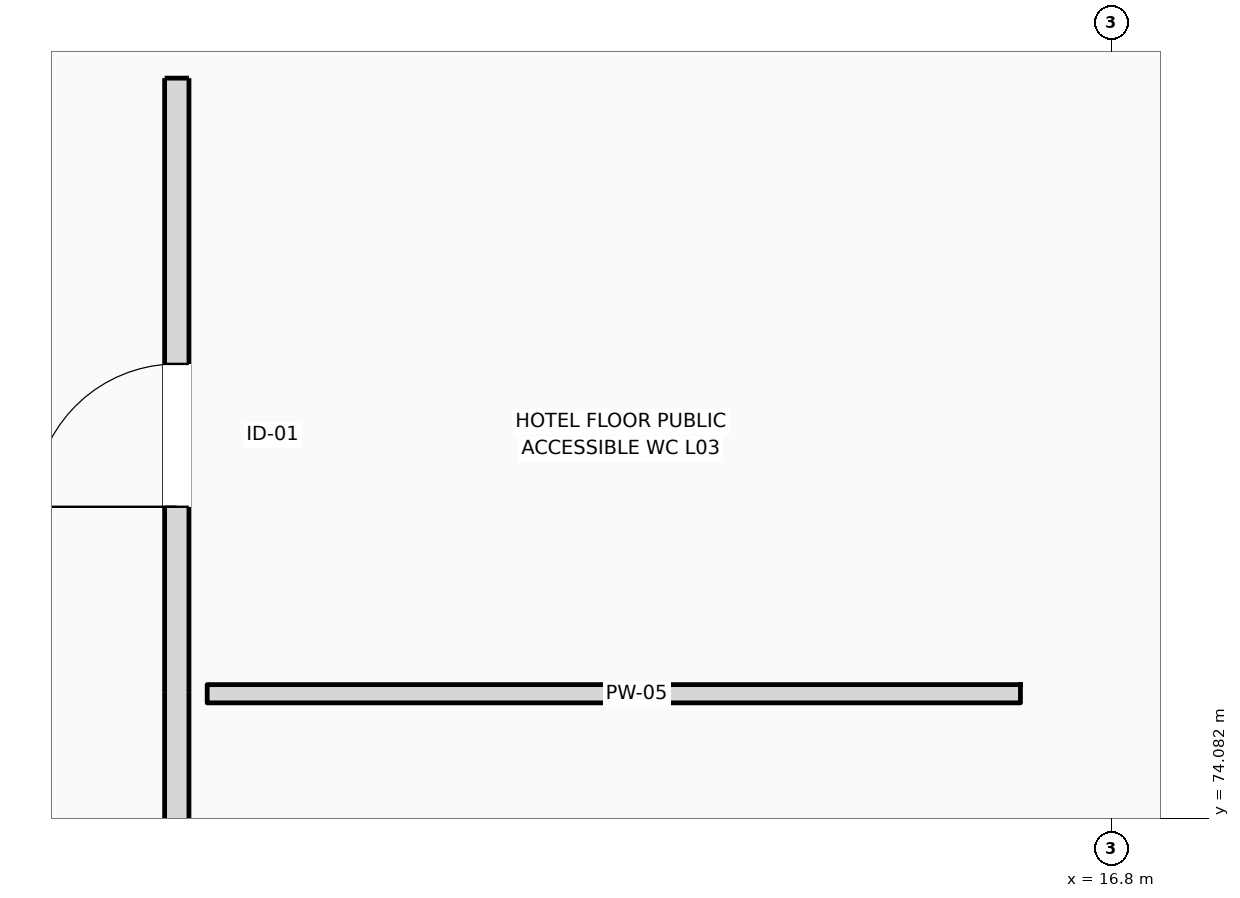
"""IFC4 building model, lengths in metres.
Left out: names, types, materials, properties, quantities, classifications, styles, units other than length and angle.
Written with IfcOpenShell. Run it as: python <this file> out.ifc"""

import sys

from ifc_helpers import new_model, si_unit, direction, frame, frame_2d, origin, place, context, subcontext, project, spatial, rectangle, extrude, element, fill, save


model = new_model("IFC4")
c1 = context("Model", 3, precision=1e-05, world=origin(), true_north=direction((0.0, 1.0)))
c2 = subcontext(c1, "Body", "Model", "MODEL_VIEW")
j1 = project(units=[si_unit("LENGTHUNIT", "METRE"), si_unit("PLANEANGLEUNIT", "RADIAN")], contexts=[c1])
p1 = place(None, origin())
s1 = spatial("IfcSite", under=j1, at=p1, CompositionType="ELEMENT")
p2 = place(p1, origin())
s2 = spatial("IfcBuilding", under=s1, at=p2, CompositionType="ELEMENT")
p3 = place(p2, frame((0.0, 0.0, 16.2)))
s3 = spatial("IfcBuildingStorey", under=s2, at=p3, CompositionType="ELEMENT", Elevation=16.2)
p4 = place(p3, frame((10.65, 62.64, 0.0), z_axis=(0.0, 0.0, 1.0), x_axis=(0.0, 1.0, 0.0)))
e1 = element("IfcWall", 1, at=p4, inside=s3, PredefinedType="PARTITIONING", context=c2, shape_type="SweptSolid", body=[
    extrude(rectangle(XDim=16.31, YDim=0.16, at=frame_2d((8.155, 0.0))), origin(), (0.0, 0.0, 1.0), 3.92),
])
p5 = place(p4, frame((3.61, 0.0, 0.0)))
e2 = element("IfcOpeningElement", 2, at=p5, cuts=e1, PredefinedType="OPENING", context=c2, shape_type="SweptSolid", body=[
    extrude(rectangle(XDim=1.3, YDim=2.2, at=frame_2d((0.65, 1.1))), frame((0.0, 0.09, 0.0), z_axis=(0.0, -1.0, 0.0), x_axis=(1.0, 0.0, 0.0)), (0.0, 0.0, 1.0), 0.18),
])
p6 = place(p4, frame((9.735, 0.0, 0.0)))
e3 = element("IfcOpeningElement", 3, at=p6, cuts=e1, PredefinedType="OPENING", context=c2, shape_type="SweptSolid", body=[
    extrude(rectangle(XDim=1.05, YDim=2.12, at=frame_2d((0.525, 1.06))), frame((0.0, 0.09, 0.0), z_axis=(0.0, -1.0, 0.0), x_axis=(1.0, 0.0, 0.0)), (0.0, 0.0, 1.0), 0.18),
])
p7 = place(p4, frame((13.49, 0.0, 0.0)))
e4 = element("IfcOpeningElement", 4, at=p7, cuts=e1, PredefinedType="OPENING", context=c2, shape_type="SweptSolid", body=[
    extrude(rectangle(XDim=0.94, YDim=2.15, at=frame_2d((0.47, 1.075))), frame((0.0, 0.09, 0.0), z_axis=(0.0, -1.0, 0.0), x_axis=(1.0, 0.0, 0.0)), (0.0, 0.0, 1.0), 0.18),
])
p8 = place(p3, frame((10.85, 74.9, 0.0), z_axis=(0.0, 0.0, 1.0), x_axis=(1.0, 0.0, 0.0)))
e5 = element("IfcWall", 5, at=p8, inside=s3, PredefinedType="PARTITIONING", context=c2, shape_type="SweptSolid", body=[
    extrude(rectangle(XDim=5.35, YDim=0.12, at=frame_2d((2.675, 0.0))), origin(), (0.0, 0.0, 1.0), 3.92),
])
p9 = place(p7, origin())
e6 = element("IfcDoor", 6, at=p9, inside=s3, OperationType="SINGLE_SWING_LEFT", PredefinedType="DOOR", context=c2, shape_type="SweptSolid", body=[
    extrude(rectangle(XDim=0.94, YDim=2.15, at=frame_2d((0.47, 1.075))), frame((0.0, 0.025, 0.0), z_axis=(0.0, -1.0, 0.0), x_axis=(1.0, 0.0, 0.0)), (0.0, 0.0, 1.0), 0.05),
])
fill(e4, e6)
save(model, sys.argv[1])
